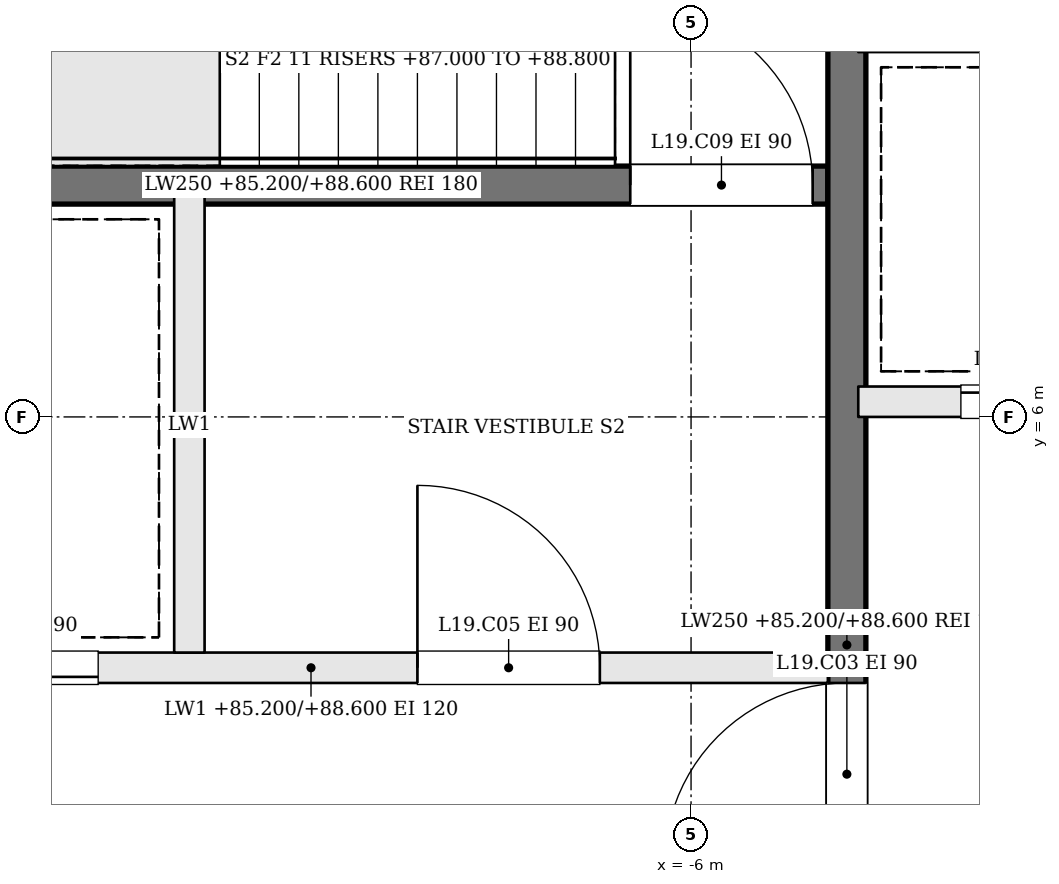
"""IFC4 building model, lengths in metres.
Left out: names, types, materials, properties, quantities, classifications, styles, units other than length and angle.
Written with IfcOpenShell. Run it as: python <this file> out.ifc"""

import sys

from ifc_helpers import new_model, si_unit, direction, frame, frame_2d, origin, place, context, subcontext, project, spatial, rectangle, extrude, element, fill, save


model = new_model("IFC4")
c1 = context("Model", 3, precision=1e-05, world=origin(), true_north=direction((0.0, 1.0)))
c2 = subcontext(c1, "Body", "Model", "MODEL_VIEW")
j1 = project(units=[si_unit("LENGTHUNIT", "METRE"), si_unit("PLANEANGLEUNIT", "RADIAN")], contexts=[c1])
p1 = place(None, origin())
s1 = spatial("IfcSite", under=j1, at=p1, CompositionType="ELEMENT")
p2 = place(p1, origin())
s2 = spatial("IfcBuilding", under=s1, at=p2, CompositionType="ELEMENT")
p3 = place(p2, frame((0.0, 0.0, 85.2)))
s3 = spatial("IfcBuildingStorey", under=s2, at=p3, CompositionType="ELEMENT", Elevation=85.2)
p4 = place(p3, frame((-11.9, 4.35, 0.0), z_axis=(0.0, 0.0, 1.0), x_axis=(1.0, 0.0, 0.0)))
e1 = element("IfcWall", 1, at=p4, inside=s3, PredefinedType="SOLIDWALL", context=c2, shape_type="SweptSolid", body=[
    extrude(rectangle(XDim=6.8, YDim=0.2, at=frame_2d((3.4, 0.0))), origin(), (0.0, 0.0, 1.0), 3.4),
])
p5 = place(p4, frame((4.1, 0.0, 0.0)))
e2 = element("IfcOpeningElement", 2, at=p5, cuts=e1, PredefinedType="OPENING", context=c2, shape_type="SweptSolid", body=[
    extrude(rectangle(XDim=1.2, YDim=2.1, at=frame_2d((0.6, 1.05))), frame((0.0, 0.11, 0.0), z_axis=(0.0, -1.0, 0.0), x_axis=(1.0, 0.0, 0.0)), (0.0, 0.0, 1.0), 0.22),
])
p6 = place(p4, frame((0.8, 0.0, 0.0)))
e3 = element("IfcOpeningElement", 3, at=p6, cuts=e1, PredefinedType="OPENING", context=c2, shape_type="SweptSolid", body=[
    extrude(rectangle(XDim=1.2, YDim=2.1, at=frame_2d((0.6, 1.05))), frame((0.0, 0.11, 0.0), z_axis=(0.0, -1.0, 0.0), x_axis=(1.0, 0.0, 0.0)), (0.0, 0.0, 1.0), 0.22),
])
p7 = place(p3, frame((-11.9, 7.525, 0.0), z_axis=(0.0, 0.0, 1.0), x_axis=(1.0, 0.0, 0.0)))
e4 = element("IfcWall", 4, at=p7, inside=s3, PredefinedType="SOLIDWALL", context=c2, shape_type="SweptSolid", body=[
    extrude(rectangle(XDim=6.8, YDim=0.25, at=frame_2d((3.4, 0.0))), origin(), (0.0, 0.0, 1.0), 3.4),
])
p8 = place(p7, frame((5.5, 0.0, 0.0)))
e5 = element("IfcOpeningElement", 5, at=p8, cuts=e4, PredefinedType="OPENING", context=c2, shape_type="SweptSolid", body=[
    extrude(rectangle(XDim=1.2, YDim=2.1, at=frame_2d((0.6, 1.05))), frame((0.0, 0.135, 0.0), z_axis=(0.0, -1.0, 0.0), x_axis=(1.0, 0.0, 0.0)), (0.0, 0.0, 1.0), 0.27),
])
p9 = place(p3, frame((-9.3, 4.45, 0.0), z_axis=(0.0, 0.0, 1.0), x_axis=(0.0, 1.0, 0.0)))
e6 = element("IfcWall", 6, at=p9, inside=s3, PredefinedType="SOLIDWALL", context=c2, shape_type="SweptSolid", body=[
    extrude(rectangle(XDim=3.0, YDim=0.2, at=frame_2d((1.5, 0.0))), origin(), (0.0, 0.0, 1.0), 3.4),
])
p10 = place(p3, frame((-4.975, -1.9, 0.0), z_axis=(0.0, 0.0, 1.0), x_axis=(0.0, 1.0, 0.0)))
e7 = element("IfcWall", 7, at=p10, inside=s3, PredefinedType="SOLIDWALL", context=c2, shape_type="SweptSolid", body=[
    extrude(rectangle(XDim=12.8, YDim=0.25, at=frame_2d((6.4, 0.0))), origin(), (0.0, 0.0, 1.0), 3.4),
])
p11 = place(p10, frame((4.95, 0.0, 0.0)))
e8 = element("IfcOpeningElement", 8, at=p11, cuts=e7, PredefinedType="OPENING", context=c2, shape_type="SweptSolid", body=[
    extrude(rectangle(XDim=1.2, YDim=2.1, at=frame_2d((0.6, 1.05))), frame((0.0, 0.135, 0.0), z_axis=(0.0, -1.0, 0.0), x_axis=(1.0, 0.0, 0.0)), (0.0, 0.0, 1.0), 0.27),
])
p12 = place(p3, frame((-4.9, 6.1, 0.0), z_axis=(0.0, 0.0, 1.0), x_axis=(1.0, 0.0, 0.0)))
e9 = element("IfcWall", 9, at=p12, inside=s3, PredefinedType="SOLIDWALL", context=c2, shape_type="SweptSolid", body=[
    extrude(rectangle(XDim=9.8, YDim=0.2, at=frame_2d((4.9, 0.0))), origin(), (0.0, 0.0, 1.0), 3.4),
])
p13 = place(p12, frame((0.675, 0.0, 0.0)))
e10 = element("IfcOpeningElement", 10, at=p13, cuts=e9, PredefinedType="OPENING", context=c2, shape_type="SweptSolid", body=[
    extrude(rectangle(XDim=1.1, YDim=2.1, at=frame_2d((0.55, 1.05))), frame((0.0, 0.11, 0.0), z_axis=(0.0, -1.0, 0.0), x_axis=(1.0, 0.0, 0.0)), (0.0, 0.0, 1.0), 0.22),
])
p14 = place(p12, frame((3.125, 0.0, 0.0)))
e11 = element("IfcOpeningElement", 11, at=p14, cuts=e9, PredefinedType="OPENING", context=c2, shape_type="SweptSolid", body=[
    extrude(rectangle(XDim=1.1, YDim=2.1, at=frame_2d((0.55, 1.05))), frame((0.0, 0.11, 0.0), z_axis=(0.0, -1.0, 0.0), x_axis=(1.0, 0.0, 0.0)), (0.0, 0.0, 1.0), 0.22),
])
p15 = place(p12, frame((5.575, 0.0, 0.0)))
e12 = element("IfcOpeningElement", 12, at=p15, cuts=e9, PredefinedType="OPENING", context=c2, shape_type="SweptSolid", body=[
    extrude(rectangle(XDim=1.1, YDim=2.1, at=frame_2d((0.55, 1.05))), frame((0.0, 0.11, 0.0), z_axis=(0.0, -1.0, 0.0), x_axis=(1.0, 0.0, 0.0)), (0.0, 0.0, 1.0), 0.22),
])
p16 = place(p12, frame((8.025, 0.0, 0.0)))
e13 = element("IfcOpeningElement", 13, at=p16, cuts=e9, PredefinedType="OPENING", context=c2, shape_type="SweptSolid", body=[
    extrude(rectangle(XDim=1.1, YDim=2.1, at=frame_2d((0.55, 1.05))), frame((0.0, 0.11, 0.0), z_axis=(0.0, -1.0, 0.0), x_axis=(1.0, 0.0, 0.0)), (0.0, 0.0, 1.0), 0.22),
])
p17 = place(p11, origin())
e14 = element("IfcDoor", 14, at=p17, inside=s3, OperationType="SINGLE_SWING_LEFT", PredefinedType="DOOR", context=c2, shape_type="SweptSolid", body=[
    extrude(rectangle(XDim=1.2, YDim=2.1, at=frame_2d((0.6, 1.05))), frame((0.0, 0.025, 0.0), z_axis=(0.0, -1.0, 0.0), x_axis=(1.0, 0.0, 0.0)), (0.0, 0.0, 1.0), 0.05),
])
fill(e8, e14)
p18 = place(p5, origin())
e15 = element("IfcDoor", 15, at=p18, inside=s3, OperationType="SINGLE_SWING_LEFT", PredefinedType="DOOR", context=c2, shape_type="SweptSolid", body=[
    extrude(rectangle(XDim=1.2, YDim=2.1, at=frame_2d((0.6, 1.05))), frame((0.0, 0.025, 0.0), z_axis=(0.0, -1.0, 0.0), x_axis=(1.0, 0.0, 0.0)), (0.0, 0.0, 1.0), 0.05),
])
fill(e2, e15)
p19 = place(p8, origin())
e16 = element("IfcDoor", 16, at=p19, inside=s3, OperationType="SINGLE_SWING_LEFT", PredefinedType="DOOR", context=c2, shape_type="SweptSolid", body=[
    extrude(rectangle(XDim=1.2, YDim=2.1, at=frame_2d((0.6, 1.05))), frame((0.0, 0.025, 0.0), z_axis=(0.0, -1.0, 0.0), x_axis=(1.0, 0.0, 0.0)), (0.0, 0.0, 1.0), 0.05),
])
fill(e5, e16)
p20 = place(p6, origin())
e17 = element("IfcDoor", 17, at=p20, inside=s3, OperationType="SLIDING_TO_RIGHT", PredefinedType="DOOR", context=c2, shape_type="SweptSolid", body=[
    extrude(rectangle(XDim=1.2, YDim=2.1, at=frame_2d((0.6, 1.05))), frame((0.0, 0.025, 0.0), z_axis=(0.0, -1.0, 0.0), x_axis=(1.0, 0.0, 0.0)), (0.0, 0.0, 1.0), 0.05),
])
fill(e3, e17)
p21 = place(p13, origin())
e18 = element("IfcDoor", 18, at=p21, inside=s3, OperationType="SLIDING_TO_RIGHT", PredefinedType="DOOR", context=c2, shape_type="SweptSolid", body=[
    extrude(rectangle(XDim=1.1, YDim=2.1, at=frame_2d((0.55, 1.05))), frame((0.0, 0.025, 0.0), z_axis=(0.0, -1.0, 0.0), x_axis=(1.0, 0.0, 0.0)), (0.0, 0.0, 1.0), 0.05),
])
fill(e10, e18)
save(model, sys.argv[1])
